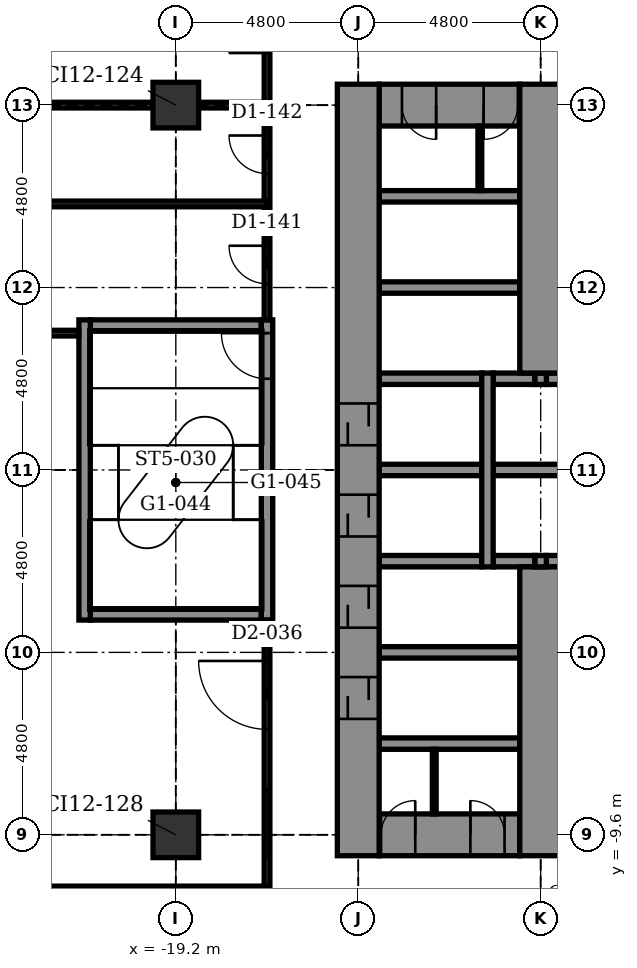
"""IFC4 building model, lengths in metres.
Left out: names, types, materials, properties, quantities, classifications, styles, units other than length and angle.
Written with IfcOpenShell. Run it as: python <this file> out.ifc"""

import sys

from ifc_helpers import new_model, si_unit, direction, frame, frame_2d, origin, origin_2d, place, context, subcontext, project, spatial, rectangle, extrude, element, fill, save


model = new_model("IFC4")
c1 = context("Model", 3, precision=1e-05, world=origin(), true_north=direction((0.0, 1.0)))
c2 = subcontext(c1, "Body", "Model", "MODEL_VIEW")
j1 = project(units=[si_unit("LENGTHUNIT", "METRE"), si_unit("PLANEANGLEUNIT", "RADIAN")], contexts=[c1])
p1 = place(None, origin())
s1 = spatial("IfcSite", under=j1, at=p1, CompositionType="ELEMENT")
p2 = place(p1, origin())
s2 = spatial("IfcBuilding", under=s1, at=p2, CompositionType="ELEMENT")
p3 = place(p2, frame((0.0, 0.0, 60.9)))
s3 = spatial("IfcBuildingStorey", under=s2, at=p3, CompositionType="ELEMENT", Elevation=60.9)
for number, where, z_axis, x_axis in (
    (1, (-19.2, -9.6, -0.25), (0.0, 0.0, 1.0), (1.0, 0.0, 0.0)),
    (2, (-19.2, 9.6, -0.25), (0.0, 0.0, 1.0), (1.0, 0.0, 0.0)),
):
    element("IfcColumn", number, at=place(p3, frame(where, z_axis=z_axis, x_axis=x_axis)), inside=s3, PredefinedType="COLUMN", context=c2, shape_type="SweptSolid", body=[
        extrude(rectangle(XDim=1.2, YDim=1.2, at=origin_2d()), origin(), (0.0, 0.0, 1.0), 5.45),
    ])
p4 = place(p3, frame((-13.85, -9.6, -0.25), z_axis=(0.0, 0.0, 1.0), x_axis=(1.0, 0.0, 0.0)))
e3 = element("IfcWall", 3, at=p4, inside=s3, PredefinedType="SHEAR", context=c2, shape_type="SweptSolid", body=[
    extrude(rectangle(XDim=3.7, YDim=1.1, at=frame_2d((1.85, 0.0))), origin(), (0.0, 0.0, 1.0), 5.45),
])
p5 = place(p4, frame((0.05, 0.0, 0.25)))
e4 = element("IfcOpeningElement", 4, at=p5, cuts=e3, PredefinedType="OPENING", context=c2, shape_type="SweptSolid", body=[
    extrude(rectangle(XDim=0.9, YDim=2.1, at=frame_2d((0.45, 1.05))), frame((0.0, 0.56, 0.0), z_axis=(0.0, -1.0, 0.0), x_axis=(1.0, 0.0, 0.0)), (0.0, 0.0, 1.0), 1.12),
])
p6 = place(p4, frame((2.4, 0.0, 0.25)))
e5 = element("IfcOpeningElement", 5, at=p6, cuts=e3, PredefinedType="OPENING", context=c2, shape_type="SweptSolid", body=[
    extrude(rectangle(XDim=0.9, YDim=2.1, at=frame_2d((0.45, 1.05))), frame((0.0, 0.56, 0.0), z_axis=(0.0, -1.0, 0.0), x_axis=(1.0, 0.0, 0.0)), (0.0, 0.0, 1.0), 1.12),
])
for number, where, z_axis, x_axis in (
    (6, (-13.85, -7.2, -0.25), (0.0, 0.0, 1.0), (1.0, 0.0, 0.0)),
    (7, (-13.85, -4.8, -0.25), (0.0, 0.0, 1.0), (1.0, 0.0, 0.0)),
):
    element("IfcWall", number, at=place(p3, frame(where, z_axis=z_axis, x_axis=x_axis)), inside=s3, PredefinedType="STANDARD", context=c2, shape_type="SweptSolid", body=[
        extrude(rectangle(XDim=3.7, YDim=0.3, at=frame_2d((1.85, 0.0))), origin(), (0.0, 0.0, 1.0), 5.45),
    ])
p7 = place(p3, frame((-21.45, -3.8, -0.25), z_axis=(0.0, 0.0, 1.0), x_axis=(1.0, 0.0, 0.0)))
e8 = element("IfcWall", 8, at=p7, inside=s3, PredefinedType="STANDARD", context=c2, shape_type="SweptSolid", body=[
    extrude(rectangle(XDim=4.5, YDim=0.3, at=frame_2d((2.25, 0.0))), origin(), (0.0, 0.0, 1.0), 5.45),
])
p8 = place(p3, frame((-13.85, -2.4, -0.25), z_axis=(0.0, 0.0, 1.0), x_axis=(1.0, 0.0, 0.0)))
e9 = element("IfcWall", 9, at=p8, inside=s3, PredefinedType="STANDARD", context=c2, shape_type="SweptSolid", body=[
    extrude(rectangle(XDim=2.7, YDim=0.3, at=frame_2d((1.35, 0.0))), origin(), (0.0, 0.0, 1.0), 5.45),
])
p9 = place(p3, frame((-10.85, -2.4, -0.25), z_axis=(0.0, 0.0, 1.0), x_axis=(1.0, 0.0, 0.0)))
e10 = element("IfcWall", 10, at=p9, inside=s3, PredefinedType="STANDARD", context=c2, shape_type="SweptSolid", body=[
    extrude(rectangle(XDim=1.1, YDim=0.3, at=frame_2d((0.55, 0.0))), origin(), (0.0, 0.0, 1.0), 5.45),
])
p10 = place(p3, frame((-9.45, -2.4, -0.25), z_axis=(0.0, 0.0, 1.0), x_axis=(1.0, 0.0, 0.0)))
e11 = element("IfcWall", 11, at=p10, inside=s3, PredefinedType="STANDARD", context=c2, shape_type="SweptSolid", body=[
    extrude(rectangle(XDim=1.9, YDim=0.3, at=frame_2d((0.95, 0.0))), origin(), (0.0, 0.0, 1.0), 5.45),
])
p11 = place(p3, frame((-13.85, 0.0, -0.25), z_axis=(0.0, 0.0, 1.0), x_axis=(1.0, 0.0, 0.0)))
e12 = element("IfcWall", 12, at=p11, inside=s3, PredefinedType="STANDARD", context=c2, shape_type="SweptSolid", body=[
    extrude(rectangle(XDim=2.7, YDim=0.3, at=frame_2d((1.35, 0.0))), origin(), (0.0, 0.0, 1.0), 5.45),
])
p12 = place(p3, frame((-10.85, 0.0, -0.25), z_axis=(0.0, 0.0, 1.0), x_axis=(1.0, 0.0, 0.0)))
e13 = element("IfcWall", 13, at=p12, inside=s3, PredefinedType="STANDARD", context=c2, shape_type="SweptSolid", body=[
    extrude(rectangle(XDim=3.3, YDim=0.3, at=frame_2d((1.65, 0.0))), origin(), (0.0, 0.0, 1.0), 5.45),
])
p13 = place(p3, frame((-13.85, 2.4, -0.25), z_axis=(0.0, 0.0, 1.0), x_axis=(1.0, 0.0, 0.0)))
e14 = element("IfcWall", 14, at=p13, inside=s3, PredefinedType="STANDARD", context=c2, shape_type="SweptSolid", body=[
    extrude(rectangle(XDim=2.7, YDim=0.3, at=frame_2d((1.35, 0.0))), origin(), (0.0, 0.0, 1.0), 5.45),
])
p14 = place(p3, frame((-10.85, 2.4, -0.25), z_axis=(0.0, 0.0, 1.0), x_axis=(1.0, 0.0, 0.0)))
e15 = element("IfcWall", 15, at=p14, inside=s3, PredefinedType="STANDARD", context=c2, shape_type="SweptSolid", body=[
    extrude(rectangle(XDim=1.1, YDim=0.3, at=frame_2d((0.55, 0.0))), origin(), (0.0, 0.0, 1.0), 5.45),
])
p15 = place(p3, frame((-9.45, 2.4, -0.25), z_axis=(0.0, 0.0, 1.0), x_axis=(1.0, 0.0, 0.0)))
e16 = element("IfcWall", 16, at=p15, inside=s3, PredefinedType="STANDARD", context=c2, shape_type="SweptSolid", body=[
    extrude(rectangle(XDim=1.9, YDim=0.3, at=frame_2d((0.95, 0.0))), origin(), (0.0, 0.0, 1.0), 5.45),
])
p16 = place(p3, frame((-21.45, 3.8, -0.25), z_axis=(0.0, 0.0, 1.0), x_axis=(1.0, 0.0, 0.0)))
e17 = element("IfcWall", 17, at=p16, inside=s3, PredefinedType="STANDARD", context=c2, shape_type="SweptSolid", body=[
    extrude(rectangle(XDim=4.5, YDim=0.3, at=frame_2d((2.25, 0.0))), origin(), (0.0, 0.0, 1.0), 5.45),
])
for number, where, z_axis, x_axis in (
    (18, (-13.85, 4.8, -0.25), (0.0, 0.0, 1.0), (1.0, 0.0, 0.0)),
    (19, (-13.85, 7.2, -0.25), (0.0, 0.0, 1.0), (1.0, 0.0, 0.0)),
):
    element("IfcWall", number, at=place(p3, frame(where, z_axis=z_axis, x_axis=x_axis)), inside=s3, PredefinedType="STANDARD", context=c2, shape_type="SweptSolid", body=[
        extrude(rectangle(XDim=3.7, YDim=0.3, at=frame_2d((1.85, 0.0))), origin(), (0.0, 0.0, 1.0), 5.45),
    ])
p17 = place(p3, frame((-13.85, 9.6, -0.25), z_axis=(0.0, 0.0, 1.0), x_axis=(1.0, 0.0, 0.0)))
e20 = element("IfcWall", 20, at=p17, inside=s3, PredefinedType="SHEAR", context=c2, shape_type="SweptSolid", body=[
    extrude(rectangle(XDim=3.7, YDim=1.1, at=frame_2d((1.85, 0.0))), origin(), (0.0, 0.0, 1.0), 5.45),
])
p18 = place(p17, frame((0.6, 0.0, 0.25)))
e21 = element("IfcOpeningElement", 21, at=p18, cuts=e20, PredefinedType="OPENING", context=c2, shape_type="SweptSolid", body=[
    extrude(rectangle(XDim=0.9, YDim=2.1, at=frame_2d((0.45, 1.05))), frame((0.0, 0.56, 0.0), z_axis=(0.0, -1.0, 0.0), x_axis=(1.0, 0.0, 0.0)), (0.0, 0.0, 1.0), 1.12),
])
p19 = place(p17, frame((2.75, 0.0, 0.25)))
e22 = element("IfcOpeningElement", 22, at=p19, cuts=e20, PredefinedType="OPENING", context=c2, shape_type="SweptSolid", body=[
    extrude(rectangle(XDim=0.9, YDim=2.1, at=frame_2d((0.45, 1.05))), frame((0.0, 0.56, 0.0), z_axis=(0.0, -1.0, 0.0), x_axis=(1.0, 0.0, 0.0)), (0.0, 0.0, 1.0), 1.12),
])
p20 = place(p3, frame((-21.6, -3.95, -0.25), z_axis=(0.0, 0.0, 1.0), x_axis=(0.0, 1.0, 0.0)))
e23 = element("IfcWall", 23, at=p20, inside=s3, PredefinedType="STANDARD", context=c2, shape_type="SweptSolid", body=[
    extrude(rectangle(XDim=7.9, YDim=0.3, at=frame_2d((3.95, 0.0))), origin(), (0.0, 0.0, 1.0), 5.45),
])
p21 = place(p3, frame((-16.8, -3.95, -0.25), z_axis=(0.0, 0.0, 1.0), x_axis=(0.0, 1.0, 0.0)))
e24 = element("IfcWall", 24, at=p21, inside=s3, PredefinedType="STANDARD", context=c2, shape_type="SweptSolid", body=[
    extrude(rectangle(XDim=7.9, YDim=0.3, at=frame_2d((3.95, 0.0))), origin(), (0.0, 0.0, 1.0), 5.45),
])
p22 = place(p21, frame((6.35, 0.0, 0.25)))
e25 = element("IfcOpeningElement", 25, at=p22, cuts=e24, PredefinedType="OPENING", context=c2, shape_type="SweptSolid", body=[
    extrude(rectangle(XDim=1.2, YDim=2.1, at=frame_2d((0.6, 1.05))), frame((0.0, 0.16, 0.0), z_axis=(0.0, -1.0, 0.0), x_axis=(1.0, 0.0, 0.0)), (0.0, 0.0, 1.0), 0.32),
])
p23 = place(p3, frame((-14.4, -10.15, -0.25), z_axis=(0.0, 0.0, 1.0), x_axis=(0.0, 1.0, 0.0)))
e26 = element("IfcWall", 26, at=p23, inside=s3, PredefinedType="SHEAR", context=c2, shape_type="SweptSolid", body=[
    extrude(rectangle(XDim=20.3, YDim=1.1, at=frame_2d((10.15, 0.0))), origin(), (0.0, 0.0, 1.0), 5.45),
])
p24 = place(p23, frame((3.6, 0.0, 0.25)))
e27 = element("IfcOpeningElement", 27, at=p24, cuts=e26, PredefinedType="OPENING", context=c2, shape_type="SweptSolid", body=[
    extrude(rectangle(XDim=1.1, YDim=2.1, at=frame_2d((0.55, 1.05))), frame((0.0, 0.56, 0.0), z_axis=(0.0, -1.0, 0.0), x_axis=(1.0, 0.0, 0.0)), (0.0, 0.0, 1.0), 1.12),
])
p25 = place(p23, frame((6.0, 0.0, 0.25)))
e28 = element("IfcOpeningElement", 28, at=p25, cuts=e26, PredefinedType="OPENING", context=c2, shape_type="SweptSolid", body=[
    extrude(rectangle(XDim=1.1, YDim=2.1, at=frame_2d((0.55, 1.05))), frame((0.0, 0.56, 0.0), z_axis=(0.0, -1.0, 0.0), x_axis=(1.0, 0.0, 0.0)), (0.0, 0.0, 1.0), 1.12),
])
p26 = place(p23, frame((8.4, 0.0, 0.25)))
e29 = element("IfcOpeningElement", 29, at=p26, cuts=e26, PredefinedType="OPENING", context=c2, shape_type="SweptSolid", body=[
    extrude(rectangle(XDim=1.1, YDim=2.1, at=frame_2d((0.55, 1.05))), frame((0.0, 0.56, 0.0), z_axis=(0.0, -1.0, 0.0), x_axis=(1.0, 0.0, 0.0)), (0.0, 0.0, 1.0), 1.12),
])
p27 = place(p23, frame((10.8, 0.0, 0.25)))
e30 = element("IfcOpeningElement", 30, at=p27, cuts=e26, PredefinedType="OPENING", context=c2, shape_type="SweptSolid", body=[
    extrude(rectangle(XDim=1.1, YDim=2.1, at=frame_2d((0.55, 1.05))), frame((0.0, 0.56, 0.0), z_axis=(0.0, -1.0, 0.0), x_axis=(1.0, 0.0, 0.0)), (0.0, 0.0, 1.0), 1.12),
])
p28 = place(p3, frame((-11.0, -2.55, -0.25), z_axis=(0.0, 0.0, 1.0), x_axis=(0.0, 1.0, 0.0)))
e31 = element("IfcWall", 31, at=p28, inside=s3, PredefinedType="STANDARD", context=c2, shape_type="SweptSolid", body=[
    extrude(rectangle(XDim=5.1, YDim=0.3, at=frame_2d((2.55, 0.0))), origin(), (0.0, 0.0, 1.0), 5.45),
])
p29 = place(p3, frame((-9.6, -10.15, -0.25), z_axis=(0.0, 0.0, 1.0), x_axis=(0.0, 1.0, 0.0)))
e32 = element("IfcWall", 32, at=p29, inside=s3, PredefinedType="SHEAR", context=c2, shape_type="SweptSolid", body=[
    extrude(rectangle(XDim=7.6, YDim=1.1, at=frame_2d((3.8, 0.0))), origin(), (0.0, 0.0, 1.0), 5.45),
])
for number, where, z_axis, x_axis in (
    (33, (-9.6, -2.55, -0.25), (0.0, 0.0, 1.0), (0.0, 1.0, 0.0)),
    (34, (-9.6, 2.25, -0.25), (0.0, 0.0, 1.0), (0.0, 1.0, 0.0)),
):
    element("IfcWall", number, at=place(p3, frame(where, z_axis=z_axis, x_axis=x_axis)), inside=s3, PredefinedType="STANDARD", context=c2, shape_type="SweptSolid", body=[
        extrude(rectangle(XDim=0.3, YDim=0.3, at=frame_2d((0.15, 0.0))), origin(), (0.0, 0.0, 1.0), 5.45),
    ])
p30 = place(p3, frame((-9.6, 2.55, -0.25), z_axis=(0.0, 0.0, 1.0), x_axis=(0.0, 1.0, 0.0)))
e35 = element("IfcWall", 35, at=p30, inside=s3, PredefinedType="SHEAR", context=c2, shape_type="SweptSolid", body=[
    extrude(rectangle(XDim=7.6, YDim=1.1, at=frame_2d((3.8, 0.0))), origin(), (0.0, 0.0, 1.0), 5.45),
])
for number, where, z_axis, x_axis in (
    (36, (-11.2, 7.35, 0.0), (0.0, 0.0, 1.0), (0.0, 1.0, 0.0)),
    (37, (-12.4, -9.05, 0.0), (0.0, 0.0, 1.0), (0.0, 1.0, 0.0)),
):
    element("IfcWall", number, at=place(p3, frame(where, z_axis=z_axis, x_axis=x_axis)), inside=s3, PredefinedType="PARTITIONING", context=c2, shape_type="SweptSolid", body=[
        extrude(rectangle(XDim=1.7, YDim=0.1, at=frame_2d((0.85, 0.0))), origin(), (0.0, 0.0, 1.0), 5.2),
    ])
p31 = place(p3, frame((-16.8, -12.4, 0.0), z_axis=(0.0, 0.0, 1.0), x_axis=(0.0, 1.0, 0.0)))
e38 = element("IfcWall", 38, at=p31, inside=s3, PredefinedType="PARTITIONING", context=c2, shape_type="SweptSolid", body=[
    extrude(rectangle(XDim=8.45, YDim=0.15, at=frame_2d((4.225, 0.0))), origin(), (0.0, 0.0, 1.0), 5.2),
])
p32 = place(p31, frame((5.575, 0.0, 0.0)))
e39 = element("IfcOpeningElement", 39, at=p32, cuts=e38, PredefinedType="OPENING", context=c2, shape_type="SweptSolid", body=[
    extrude(rectangle(XDim=1.8, YDim=2.1, at=frame_2d((0.9, 1.05))), frame((0.0, 0.085, 0.0), z_axis=(0.0, -1.0, 0.0), x_axis=(1.0, 0.0, 0.0)), (0.0, 0.0, 1.0), 0.17),
])
p33 = place(p31, frame((2.2, 0.0, 0.9)))
e40 = element("IfcOpeningElement", 40, at=p33, cuts=e38, PredefinedType="OPENING", context=c2, shape_type="SweptSolid", body=[
    extrude(rectangle(XDim=1.8, YDim=1.5, at=frame_2d((0.9, 0.75))), frame((0.0, 0.085, 0.0), z_axis=(0.0, -1.0, 0.0), x_axis=(1.0, 0.0, 0.0)), (0.0, 0.0, 1.0), 0.17),
])
p34 = place(p3, frame((-16.8, 3.95, 0.0), z_axis=(0.0, 0.0, 1.0), x_axis=(0.0, 1.0, 0.0)))
e41 = element("IfcWall", 41, at=p34, inside=s3, PredefinedType="PARTITIONING", context=c2, shape_type="SweptSolid", body=[
    extrude(rectangle(XDim=8.75, YDim=0.15, at=frame_2d((4.375, 0.0))), origin(), (0.0, 0.0, 1.0), 5.2),
])
p35 = place(p34, frame((0.95, 0.0, 0.0)))
e42 = element("IfcOpeningElement", 42, at=p35, cuts=e41, PredefinedType="OPENING", context=c2, shape_type="SweptSolid", body=[
    extrude(rectangle(XDim=1.0, YDim=2.1, at=frame_2d((0.5, 1.05))), frame((0.0, 0.085, 0.0), z_axis=(0.0, -1.0, 0.0), x_axis=(1.0, 0.0, 0.0)), (0.0, 0.0, 1.0), 0.17),
])
p36 = place(p34, frame((3.85, 0.0, 0.0)))
e43 = element("IfcOpeningElement", 43, at=p36, cuts=e41, PredefinedType="OPENING", context=c2, shape_type="SweptSolid", body=[
    extrude(rectangle(XDim=1.0, YDim=2.1, at=frame_2d((0.5, 1.05))), frame((0.0, 0.085, 0.0), z_axis=(0.0, -1.0, 0.0), x_axis=(1.0, 0.0, 0.0)), (0.0, 0.0, 1.0), 0.17),
])
p37 = place(p34, frame((7.02, 0.0, 0.0)))
e44 = element("IfcOpeningElement", 44, at=p37, cuts=e41, PredefinedType="OPENING", context=c2, shape_type="SweptSolid", body=[
    extrude(rectangle(XDim=1.0, YDim=2.1, at=frame_2d((0.5, 1.05))), frame((0.0, 0.085, 0.0), z_axis=(0.0, -1.0, 0.0), x_axis=(1.0, 0.0, 0.0)), (0.0, 0.0, 1.0), 0.17),
])
p38 = place(p3, frame((-30.178, -11.0, 0.0), z_axis=(0.0, 0.0, 1.0), x_axis=(1.0, 0.0, 0.0)))
e45 = element("IfcWall", 45, at=p38, inside=s3, PredefinedType="PARTITIONING", context=c2, shape_type="SweptSolid", body=[
    extrude(rectangle(XDim=13.378, YDim=0.1, at=frame_2d((6.689, 0.0))), origin(), (0.0, 0.0, 1.0), 5.2),
])
p39 = place(p3, frame((-34.451, 3.6, 0.0), z_axis=(0.0, 0.0, 1.0), x_axis=(1.0, 0.0, 0.0)))
e46 = element("IfcWall", 46, at=p39, inside=s3, PredefinedType="PARTITIONING", context=c2, shape_type="SweptSolid", body=[
    extrude(rectangle(XDim=12.701, YDim=0.15, at=frame_2d((6.351, 0.0))), origin(), (0.0, 0.0, 1.0), 5.2),
])
p40 = place(p3, frame((-32.488, 7.0, 0.0), z_axis=(0.0, 0.0, 1.0), x_axis=(1.0, 0.0, 0.0)))
e47 = element("IfcWall", 47, at=p40, inside=s3, PredefinedType="PARTITIONING", context=c2, shape_type="SweptSolid", body=[
    extrude(rectangle(XDim=15.688, YDim=0.15, at=frame_2d((7.844, 0.0))), origin(), (0.0, 0.0, 1.0), 5.2),
])
p41 = place(p3, frame((-30.987, 9.6, 0.0), z_axis=(0.0, 0.0, 1.0), x_axis=(1.0, 0.0, 0.0)))
e48 = element("IfcWall", 48, at=p41, inside=s3, PredefinedType="PARTITIONING", context=c2, shape_type="SweptSolid", body=[
    extrude(rectangle(XDim=11.187, YDim=0.15, at=frame_2d((5.593, 0.0))), origin(), (0.0, 0.0, 1.0), 4.36),
])
p42 = place(p3, frame((-18.6, 9.6, 0.0), z_axis=(0.0, 0.0, 1.0), x_axis=(1.0, 0.0, 0.0)))
e49 = element("IfcWall", 49, at=p42, inside=s3, PredefinedType="PARTITIONING", context=c2, shape_type="SweptSolid", body=[
    extrude(rectangle(XDim=1.8, YDim=0.15, at=frame_2d((0.9, 0.0))), origin(), (0.0, 0.0, 1.0), 4.592),
])
p43 = place(p32, origin())
e50 = element("IfcDoor", 50, at=p43, inside=s3, OperationType="SINGLE_SWING_RIGHT", PredefinedType="DOOR", context=c2, shape_type="SweptSolid", body=[
    extrude(rectangle(XDim=1.8, YDim=2.1, at=frame_2d((0.9, 1.05))), frame((0.0, 0.025, 0.0), z_axis=(0.0, -1.0, 0.0), x_axis=(1.0, 0.0, 0.0)), (0.0, 0.0, 1.0), 0.05),
])
fill(e39, e50)
p44 = place(p35, origin())
e51 = element("IfcDoor", 51, at=p44, inside=s3, OperationType="SINGLE_SWING_RIGHT", PredefinedType="DOOR", context=c2, shape_type="SweptSolid", body=[
    extrude(rectangle(XDim=1.0, YDim=2.1, at=frame_2d((0.5, 1.05))), frame((0.0, 0.025, 0.0), z_axis=(0.0, -1.0, 0.0), x_axis=(1.0, 0.0, 0.0)), (0.0, 0.0, 1.0), 0.05),
])
fill(e42, e51)
p45 = place(p36, origin())
e52 = element("IfcDoor", 52, at=p45, inside=s3, OperationType="SINGLE_SWING_RIGHT", PredefinedType="DOOR", context=c2, shape_type="SweptSolid", body=[
    extrude(rectangle(XDim=1.0, YDim=2.1, at=frame_2d((0.5, 1.05))), frame((0.0, 0.025, 0.0), z_axis=(0.0, -1.0, 0.0), x_axis=(1.0, 0.0, 0.0)), (0.0, 0.0, 1.0), 0.05),
])
fill(e43, e52)
p46 = place(p37, origin())
e53 = element("IfcDoor", 53, at=p46, inside=s3, OperationType="SINGLE_SWING_LEFT", PredefinedType="DOOR", context=c2, shape_type="SweptSolid", body=[
    extrude(rectangle(XDim=1.0, YDim=2.1, at=frame_2d((0.5, 1.05))), frame((0.0, 0.025, 0.0), z_axis=(0.0, -1.0, 0.0), x_axis=(1.0, 0.0, 0.0)), (0.0, 0.0, 1.0), 0.05),
])
fill(e44, e53)
p47 = place(p24, origin())
e54 = element("IfcDoor", 54, at=p47, inside=s3, OperationType="DOUBLE_DOOR_SLIDING", PredefinedType="DOOR", context=c2, shape_type="SweptSolid", body=[
    extrude(rectangle(XDim=1.1, YDim=2.1, at=frame_2d((0.55, 1.05))), frame((0.0, 0.025, 0.0), z_axis=(0.0, -1.0, 0.0), x_axis=(1.0, 0.0, 0.0)), (0.0, 0.0, 1.0), 0.05),
])
fill(e27, e54)
p48 = place(p25, origin())
e55 = element("IfcDoor", 55, at=p48, inside=s3, OperationType="DOUBLE_DOOR_SLIDING", PredefinedType="DOOR", context=c2, shape_type="SweptSolid", body=[
    extrude(rectangle(XDim=1.1, YDim=2.1, at=frame_2d((0.55, 1.05))), frame((0.0, 0.025, 0.0), z_axis=(0.0, -1.0, 0.0), x_axis=(1.0, 0.0, 0.0)), (0.0, 0.0, 1.0), 0.05),
])
fill(e28, e55)
p49 = place(p26, origin())
e56 = element("IfcDoor", 56, at=p49, inside=s3, OperationType="DOUBLE_DOOR_SLIDING", PredefinedType="DOOR", context=c2, shape_type="SweptSolid", body=[
    extrude(rectangle(XDim=1.1, YDim=2.1, at=frame_2d((0.55, 1.05))), frame((0.0, 0.025, 0.0), z_axis=(0.0, -1.0, 0.0), x_axis=(1.0, 0.0, 0.0)), (0.0, 0.0, 1.0), 0.05),
])
fill(e29, e56)
p50 = place(p27, origin())
e57 = element("IfcDoor", 57, at=p50, inside=s3, OperationType="DOUBLE_DOOR_SLIDING", PredefinedType="DOOR", context=c2, shape_type="SweptSolid", body=[
    extrude(rectangle(XDim=1.1, YDim=2.1, at=frame_2d((0.55, 1.05))), frame((0.0, 0.025, 0.0), z_axis=(0.0, -1.0, 0.0), x_axis=(1.0, 0.0, 0.0)), (0.0, 0.0, 1.0), 0.05),
])
fill(e30, e57)
p51 = place(p22, origin())
e58 = element("IfcDoor", 58, at=p51, inside=s3, OperationType="SINGLE_SWING_RIGHT", PredefinedType="DOOR", context=c2, shape_type="SweptSolid", body=[
    extrude(rectangle(XDim=1.2, YDim=2.1, at=frame_2d((0.6, 1.05))), frame((0.0, 0.025, 0.0), z_axis=(0.0, -1.0, 0.0), x_axis=(1.0, 0.0, 0.0)), (0.0, 0.0, 1.0), 0.05),
])
fill(e25, e58)
p52 = place(p5, origin())
e59 = element("IfcDoor", 59, at=p52, inside=s3, OperationType="SINGLE_SWING_RIGHT", PredefinedType="DOOR", context=c2, shape_type="SweptSolid", body=[
    extrude(rectangle(XDim=0.9, YDim=2.1, at=frame_2d((0.45, 1.05))), frame((0.0, 0.025, 0.0), z_axis=(0.0, -1.0, 0.0), x_axis=(1.0, 0.0, 0.0)), (0.0, 0.0, 1.0), 0.05),
])
fill(e4, e59)
p53 = place(p6, origin())
e60 = element("IfcDoor", 60, at=p53, inside=s3, OperationType="SINGLE_SWING_LEFT", PredefinedType="DOOR", context=c2, shape_type="SweptSolid", body=[
    extrude(rectangle(XDim=0.9, YDim=2.1, at=frame_2d((0.45, 1.05))), frame((0.0, 0.025, 0.0), z_axis=(0.0, -1.0, 0.0), x_axis=(1.0, 0.0, 0.0)), (0.0, 0.0, 1.0), 0.05),
])
fill(e5, e60)
p54 = place(p18, frame((0.9, 0.0, 0.0), z_axis=(0.0, 0.0, 1.0), x_axis=(-1.0, 0.0, 0.0)))
e61 = element("IfcDoor", 61, at=p54, inside=s3, OperationType="SINGLE_SWING_RIGHT", PredefinedType="DOOR", context=c2, shape_type="SweptSolid", body=[
    extrude(rectangle(XDim=0.9, YDim=2.1, at=frame_2d((0.45, 1.05))), frame((0.0, 0.025, 0.0), z_axis=(0.0, -1.0, 0.0), x_axis=(1.0, 0.0, 0.0)), (0.0, 0.0, 1.0), 0.05),
])
fill(e21, e61)
p55 = place(p19, frame((0.9, 0.0, 0.0), z_axis=(0.0, 0.0, 1.0), x_axis=(-1.0, 0.0, 0.0)))
e62 = element("IfcDoor", 62, at=p55, inside=s3, OperationType="SINGLE_SWING_LEFT", PredefinedType="DOOR", context=c2, shape_type="SweptSolid", body=[
    extrude(rectangle(XDim=0.9, YDim=2.1, at=frame_2d((0.45, 1.05))), frame((0.0, 0.025, 0.0), z_axis=(0.0, -1.0, 0.0), x_axis=(1.0, 0.0, 0.0)), (0.0, 0.0, 1.0), 0.05),
])
fill(e22, e62)
p56 = place(p33, origin())
e63 = element("IfcWindow", 63, at=p56, inside=s3, PartitioningType="SINGLE_PANEL", PredefinedType="WINDOW", context=c2, shape_type="SweptSolid", body=[
    extrude(rectangle(XDim=1.8, YDim=1.5, at=frame_2d((0.9, 0.75))), frame((0.0, 0.03, 0.0), z_axis=(0.0, -1.0, 0.0), x_axis=(1.0, 0.0, 0.0)), (0.0, 0.0, 1.0), 0.06),
])
fill(e40, e63)
save(model, sys.argv[1])
